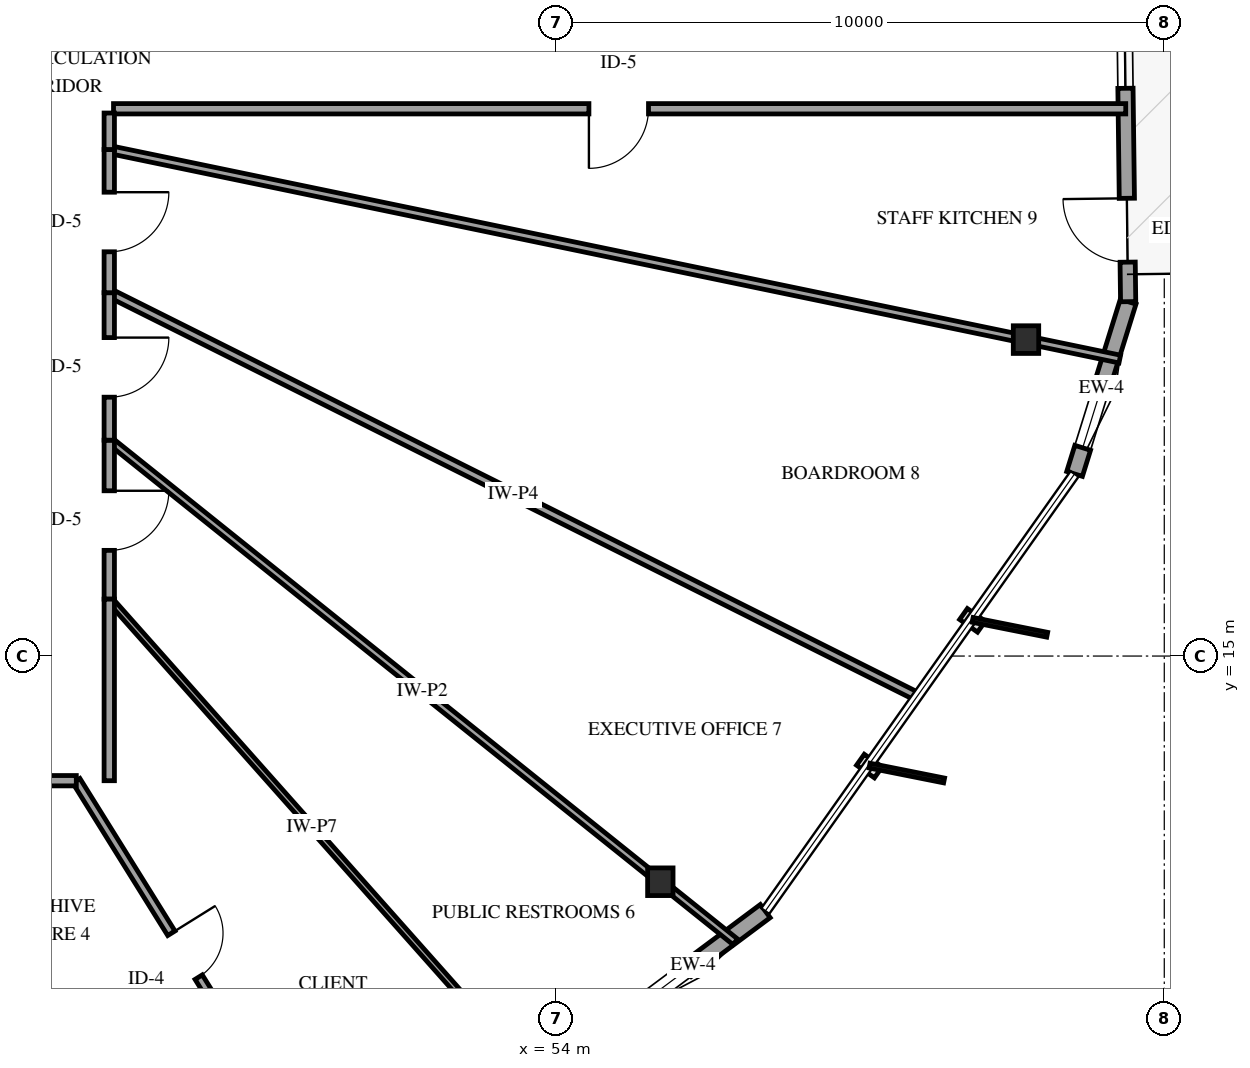
"""IFC4 building model, lengths in metres.
Left out: names, types, materials, properties, quantities, classifications, styles, units other than length and angle.
Written with IfcOpenShell. Run it as: python <this file> out.ifc"""

import sys

from ifc_helpers import new_model, si_unit, direction, frame, frame_2d, origin, origin_2d, place, context, subcontext, project, spatial, rectangle, i_section, extrude, element, fill, save


model = new_model("IFC4")
c1 = context("Model", 3, precision=1e-05, world=origin(), true_north=direction((0.0, 1.0)))
c2 = subcontext(c1, "Body", "Model", "MODEL_VIEW")
j1 = project(units=[si_unit("LENGTHUNIT", "METRE"), si_unit("PLANEANGLEUNIT", "RADIAN")], contexts=[c1])
p1 = place(None, origin())
s1 = spatial("IfcSite", under=j1, at=p1, CompositionType="ELEMENT")
p2 = place(p1, origin())
s2 = spatial("IfcBuilding", under=s1, at=p2, CompositionType="ELEMENT")
p3 = place(p2, frame((0.0, 0.0, 106.9)))
s3 = spatial("IfcBuildingStorey", under=s2, at=p3, CompositionType="ELEMENT", Elevation=106.9)
for number, where, z_axis, x_axis in (
    (1, (55.712, 11.289, 0.0), (0.0, 0.0, 1.0), (1.0, 0.0, 0.0)),
    (2, (61.726, 20.204, 0.0), (0.0, 0.0, 1.0), (1.0, 0.0, 0.0)),
):
    element("IfcColumn", number, at=place(p3, frame(where, z_axis=z_axis, x_axis=x_axis)), inside=s3, PredefinedType="COLUMN", context=c2, shape_type="SweptSolid", body=[
        extrude(i_section(OverallWidth=0.418, OverallDepth=0.455, WebThickness=0.042, FlangeThickness=0.068, FilletRadius=0.038, at=origin_2d()), origin(), (0.0, 0.0, 1.0), 3.9),
    ])
p4 = place(p3, frame((55.06, 9.032, 0.0), z_axis=(0.0, 0.0, 1.0), x_axis=(0.801547915112, 0.597930547622, 0.0)))
e3 = element("IfcWall", 3, at=p4, inside=s3, PredefinedType="SOLIDWALL", context=c2, shape_type="SweptSolid", body=[
    extrude(rectangle(XDim=2.966, YDim=0.27, at=frame_2d((1.483, 0.0))), origin(), (0.0, 0.0, 1.0), 2.979),
])
p5 = place(p4, frame((0.45, 0.0, 0.75)))
e4 = element("IfcOpeningElement", 4, at=p5, cuts=e3, PredefinedType="OPENING", context=c2, shape_type="SweptSolid", body=[
    extrude(rectangle(XDim=0.9, YDim=1.5, at=frame_2d((0.45, 0.75))), frame((0.0, 0.145, 0.0), z_axis=(0.0, -1.0, 0.0), x_axis=(1.0, 0.0, 0.0)), (0.0, 0.0, 1.0), 0.29),
])
p6 = place(p3, frame((62.525, 17.995, 0.0), z_axis=(0.0, 0.0, 1.0), x_axis=(0.29702819911, 0.954868707694, 0.0)))
e5 = element("IfcWall", 5, at=p6, inside=s3, PredefinedType="SOLIDWALL", context=c2, shape_type="SweptSolid", body=[
    extrude(rectangle(XDim=2.966, YDim=0.27, at=frame_2d((1.483, 0.0))), origin(), (0.0, 0.0, 1.0), 2.979),
])
p7 = place(p6, frame((0.45, 0.0, 0.75)))
e6 = element("IfcOpeningElement", 6, at=p7, cuts=e5, PredefinedType="OPENING", context=c2, shape_type="SweptSolid", body=[
    extrude(rectangle(XDim=0.9, YDim=1.5, at=frame_2d((0.45, 0.75))), frame((0.0, 0.145, 0.0), z_axis=(0.0, -1.0, 0.0), x_axis=(1.0, 0.0, 0.0)), (0.0, 0.0, 1.0), 0.29),
])
p8 = place(p3, frame((63.406, 20.828, 0.0), z_axis=(0.0, 0.0, 1.0), x_axis=(-0.012558271015, 0.999921141805, 0.0)))
e7 = element("IfcWall", 7, at=p8, inside=s3, PredefinedType="SOLIDWALL", context=c2, shape_type="SweptSolid", body=[
    extrude(rectangle(XDim=8.807, YDim=0.25, at=frame_2d((4.403, 0.0))), origin(), (0.0, 0.0, 1.0), 2.979),
])
p9 = place(p8, frame((0.65, 0.0, 0.0)))
e8 = element("IfcOpeningElement", 8, at=p9, cuts=e7, PredefinedType="OPENING", context=c2, shape_type="SweptSolid", body=[
    extrude(rectangle(XDim=1.05, YDim=2.15, at=frame_2d((0.525, 1.075))), frame((0.0, 0.135, 0.0), z_axis=(0.0, -1.0, 0.0), x_axis=(1.0, 0.0, 0.0)), (0.0, 0.0, 1.0), 0.27),
])
p10 = place(p8, frame((3.509, 0.0, 0.72)))
e9 = element("IfcOpeningElement", 9, at=p10, cuts=e7, PredefinedType="OPENING", context=c2, shape_type="SweptSolid", body=[
    extrude(rectangle(XDim=1.35, YDim=1.65, at=frame_2d((0.675, 0.825))), frame((0.0, 0.135, 0.0), z_axis=(0.0, -1.0, 0.0), x_axis=(1.0, 0.0, 0.0)), (0.0, 0.0, 1.0), 0.27),
])
p11 = place(p3, frame((46.65, 23.33, 0.0), z_axis=(0.0, 0.0, 1.0), x_axis=(0.979169088459, -0.203046537045, 0.0)))
e10 = element("IfcWall", 10, at=p11, inside=s3, PredefinedType="PARTITIONING", context=c2, shape_type="SweptSolid", body=[
    extrude(rectangle(XDim=16.972, YDim=0.13, at=frame_2d((8.486, 0.0))), origin(), (0.0, 0.0, 1.0), 2.895),
])
p12 = place(p3, frame((63.366, 24.0, 0.0), z_axis=(0.0, 0.0, 1.0), x_axis=(-1.0, 0.0, 0.0)))
e11 = element("IfcWall", 11, at=p12, inside=s3, PredefinedType="PARTITIONING", context=c2, shape_type="SweptSolid", body=[
    extrude(rectangle(XDim=16.646, YDim=0.17, at=frame_2d((8.323, 0.0))), origin(), (0.0, 0.0, 1.0), 3.6),
])
p13 = place(p12, frame((7.848, 0.0, 0.0)))
e12 = element("IfcOpeningElement", 12, at=p13, cuts=e11, PredefinedType="OPENING", context=c2, shape_type="SweptSolid", body=[
    extrude(rectangle(XDim=0.98, YDim=2.15, at=frame_2d((0.49, 1.075))), frame((0.0, 0.095, 0.0), z_axis=(0.0, -1.0, 0.0), x_axis=(1.0, 0.0, 0.0)), (0.0, 0.0, 1.0), 0.19),
])
p14 = place(p3, frame((46.65, 20.975, 0.0), z_axis=(0.0, 0.0, 1.0), x_axis=(0.894492933533, -0.447082086266, 0.0)))
e13 = element("IfcWall", 13, at=p14, inside=s3, PredefinedType="PARTITIONING", context=c2, shape_type="SweptSolid", body=[
    extrude(rectangle(XDim=14.852, YDim=0.14, at=frame_2d((7.426, 0.0))), origin(), (0.0, 0.0, 1.0), 3.6),
])
p15 = place(p3, frame((46.65, 18.55, 0.0), z_axis=(0.0, 0.0, 1.0), x_axis=(0.780391932211, -0.625290678117, 0.0)))
e14 = element("IfcWall", 14, at=p15, inside=s3, PredefinedType="PARTITIONING", context=c2, shape_type="SweptSolid", body=[
    extrude(rectangle(XDim=13.192, YDim=0.12, at=frame_2d((6.596, 0.0))), origin(), (0.0, 0.0, 1.0), 2.978),
])
p16 = place(p3, frame((46.65, 15.936, 0.0), z_axis=(0.0, 0.0, 1.0), x_axis=(0.66409177884, -0.747651061176, 0.0)))
e15 = element("IfcWall", 15, at=p16, inside=s3, PredefinedType="PARTITIONING", context=c2, shape_type="SweptSolid", body=[
    extrude(rectangle(XDim=10.028, YDim=0.1, at=frame_2d((5.014, 0.0))), origin(), (0.0, 0.0, 1.0), 2.978),
])
p17 = place(p3, frame((43.455, 12.95, 0.0), z_axis=(0.0, 0.0, 1.0), x_axis=(0.373857978329, -0.927485963258, 0.0)))
e16 = element("IfcWall", 16, at=p17, inside=s3, PredefinedType="PARTITIONING", context=c2, shape_type="SweptSolid", body=[
    extrude(rectangle(XDim=7.366, YDim=0.13, at=frame_2d((3.683, 0.0))), origin(), (0.0, 0.0, 1.0), 2.895),
])
p18 = place(p3, frame((46.108, 12.95, 0.0), z_axis=(0.0, 0.0, 1.0), x_axis=(0.528794527815, -0.848749873256, 0.0)))
e17 = element("IfcWall", 17, at=p18, inside=s3, PredefinedType="PARTITIONING", context=c2, shape_type="SweptSolid", body=[
    extrude(rectangle(XDim=6.763, YDim=0.14, at=frame_2d((3.381, 0.0))), origin(), (0.0, 0.0, 1.0), 3.6),
])
p19 = place(p18, frame((2.956, 0.0, 0.0)))
e18 = element("IfcOpeningElement", 18, at=p19, cuts=e17, PredefinedType="OPENING", context=c2, shape_type="SweptSolid", body=[
    extrude(rectangle(XDim=0.85, YDim=2.1, at=frame_2d((0.425, 1.05))), frame((0.0, 0.08, 0.0), z_axis=(0.0, -1.0, 0.0), x_axis=(1.0, 0.0, 0.0)), (0.0, 0.0, 1.0), 0.16),
])
p20 = place(p3, frame((46.108, 12.95, 0.0), z_axis=(0.0, 0.0, 1.0), x_axis=(-1.0, 0.0, 0.0)))
e19 = element("IfcWall", 19, at=p20, inside=s3, PredefinedType="PARTITIONING", context=c2, shape_type="SweptSolid", body=[
    extrude(rectangle(XDim=2.653, YDim=0.17, at=frame_2d((1.326, 0.0))), origin(), (0.0, 0.0, 1.0), 3.6),
])
p21 = place(p20, frame((0.851, 0.0, 0.0)))
e20 = element("IfcOpeningElement", 20, at=p21, cuts=e19, PredefinedType="OPENING", context=c2, shape_type="SweptSolid", body=[
    extrude(rectangle(XDim=0.98, YDim=2.15, at=frame_2d((0.49, 1.075))), frame((0.0, 0.095, 0.0), z_axis=(0.0, -1.0, 0.0), x_axis=(1.0, 0.0, 0.0)), (0.0, 0.0, 1.0), 0.19),
])
p22 = place(p3, frame((46.65, 18.55, 0.0), z_axis=(0.0, 0.0, 1.0), x_axis=(0.0, -1.0, 0.0)))
e21 = element("IfcWall", 21, at=p22, inside=s3, PredefinedType="PARTITIONING", context=c2, shape_type="SweptSolid", body=[
    extrude(rectangle(XDim=2.614, YDim=0.17, at=frame_2d((1.307, 0.0))), origin(), (0.0, 0.0, 1.0), 3.6),
])
p23 = place(p22, frame((0.832, 0.0, 0.0)))
e22 = element("IfcOpeningElement", 22, at=p23, cuts=e21, PredefinedType="OPENING", context=c2, shape_type="SweptSolid", body=[
    extrude(rectangle(XDim=0.98, YDim=2.15, at=frame_2d((0.49, 1.075))), frame((0.0, 0.095, 0.0), z_axis=(0.0, -1.0, 0.0), x_axis=(1.0, 0.0, 0.0)), (0.0, 0.0, 1.0), 0.19),
])
p24 = place(p3, frame((46.65, 20.975, 0.0), z_axis=(0.0, 0.0, 1.0), x_axis=(0.0, -1.0, 0.0)))
e23 = element("IfcWall", 23, at=p24, inside=s3, PredefinedType="PARTITIONING", context=c2, shape_type="SweptSolid", body=[
    extrude(rectangle(XDim=2.425, YDim=0.17, at=frame_2d((1.212, 0.0))), origin(), (0.0, 0.0, 1.0), 3.6),
])
p25 = place(p24, frame((0.738, 0.0, 0.0)))
e24 = element("IfcOpeningElement", 24, at=p25, cuts=e23, PredefinedType="OPENING", context=c2, shape_type="SweptSolid", body=[
    extrude(rectangle(XDim=0.98, YDim=2.15, at=frame_2d((0.49, 1.075))), frame((0.0, 0.095, 0.0), z_axis=(0.0, -1.0, 0.0), x_axis=(1.0, 0.0, 0.0)), (0.0, 0.0, 1.0), 0.19),
])
p26 = place(p3, frame((46.65, 23.33, 0.0), z_axis=(0.0, 0.0, 1.0), x_axis=(0.0, -1.0, 0.0)))
e25 = element("IfcWall", 25, at=p26, inside=s3, PredefinedType="PARTITIONING", context=c2, shape_type="SweptSolid", body=[
    extrude(rectangle(XDim=2.355, YDim=0.17, at=frame_2d((1.177, 0.0))), origin(), (0.0, 0.0, 1.0), 3.6),
])
p27 = place(p26, frame((0.702, 0.0, 0.0)))
e26 = element("IfcOpeningElement", 26, at=p27, cuts=e25, PredefinedType="OPENING", context=c2, shape_type="SweptSolid", body=[
    extrude(rectangle(XDim=0.98, YDim=2.15, at=frame_2d((0.49, 1.075))), frame((0.0, 0.095, 0.0), z_axis=(0.0, -1.0, 0.0), x_axis=(1.0, 0.0, 0.0)), (0.0, 0.0, 1.0), 0.19),
])
p28 = place(p3, frame((46.65, 23.93, 0.0), z_axis=(0.0, 0.0, 1.0), x_axis=(0.0, -1.0, 0.0)))
e27 = element("IfcWall", 27, at=p28, inside=s3, PredefinedType="PARTITIONING", context=c2, shape_type="SweptSolid", body=[
    extrude(rectangle(XDim=0.6, YDim=0.17, at=frame_2d((0.3, 0.0))), origin(), (0.0, 0.0, 1.0), 3.6),
])
p29 = place(p3, frame((46.65, 15.936, 0.0), z_axis=(0.0, 0.0, 1.0), x_axis=(0.0, -1.0, 0.0)))
e28 = element("IfcWall", 28, at=p29, inside=s3, PredefinedType="PARTITIONING", context=c2, shape_type="SweptSolid", body=[
    extrude(rectangle(XDim=2.986, YDim=0.17, at=frame_2d((1.493, 0.0))), origin(), (0.0, 0.0, 1.0), 3.6),
])
p30 = place(p5, origin())
e29 = element("IfcWindow", 29, at=p30, inside=s3, PartitioningType="SINGLE_PANEL", PredefinedType="WINDOW", context=c2, shape_type="SweptSolid", body=[
    extrude(rectangle(XDim=0.9, YDim=1.5, at=frame_2d((0.45, 0.75))), frame((0.0, 0.03, 0.0), z_axis=(0.0, -1.0, 0.0), x_axis=(1.0, 0.0, 0.0)), (0.0, 0.0, 1.0), 0.06),
])
fill(e4, e29)
p31 = place(p7, origin())
e30 = element("IfcWindow", 30, at=p31, inside=s3, PartitioningType="SINGLE_PANEL", PredefinedType="WINDOW", context=c2, shape_type="SweptSolid", body=[
    extrude(rectangle(XDim=0.9, YDim=1.5, at=frame_2d((0.45, 0.75))), frame((0.0, 0.03, 0.0), z_axis=(0.0, -1.0, 0.0), x_axis=(1.0, 0.0, 0.0)), (0.0, 0.0, 1.0), 0.06),
])
fill(e6, e30)
p32 = place(p9, origin())
e31 = element("IfcDoor", 31, at=p32, inside=s3, OperationType="SINGLE_SWING_RIGHT", PredefinedType="DOOR", context=c2, shape_type="SweptSolid", body=[
    extrude(rectangle(XDim=1.05, YDim=2.15, at=frame_2d((0.525, 1.075))), frame((0.0, 0.025, 0.0), z_axis=(0.0, -1.0, 0.0), x_axis=(1.0, 0.0, 0.0)), (0.0, 0.0, 1.0), 0.05),
])
fill(e8, e31)
p33 = place(p10, origin())
e32 = element("IfcWindow", 32, at=p33, inside=s3, PartitioningType="SINGLE_PANEL", PredefinedType="WINDOW", context=c2, shape_type="SweptSolid", body=[
    extrude(rectangle(XDim=1.35, YDim=1.65, at=frame_2d((0.675, 0.825))), frame((0.0, 0.03, 0.0), z_axis=(0.0, -1.0, 0.0), x_axis=(1.0, 0.0, 0.0)), (0.0, 0.0, 1.0), 0.06),
])
fill(e9, e32)
p34 = place(p13, origin())
e33 = element("IfcDoor", 33, at=p34, inside=s3, OperationType="SINGLE_SWING_RIGHT", PredefinedType="DOOR", context=c2, shape_type="SweptSolid", body=[
    extrude(rectangle(XDim=0.98, YDim=2.15, at=frame_2d((0.49, 1.075))), frame((0.0, 0.025, 0.0), z_axis=(0.0, -1.0, 0.0), x_axis=(1.0, 0.0, 0.0)), (0.0, 0.0, 1.0), 0.05),
])
fill(e12, e33)
p35 = place(p19, origin())
e34 = element("IfcDoor", 34, at=p35, inside=s3, OperationType="SINGLE_SWING_LEFT", PredefinedType="DOOR", context=c2, shape_type="SweptSolid", body=[
    extrude(rectangle(XDim=0.85, YDim=2.1, at=frame_2d((0.425, 1.05))), frame((0.0, 0.025, 0.0), z_axis=(0.0, -1.0, 0.0), x_axis=(1.0, 0.0, 0.0)), (0.0, 0.0, 1.0), 0.05),
])
fill(e18, e34)
p36 = place(p23, origin())
e35 = element("IfcDoor", 35, at=p36, inside=s3, OperationType="SINGLE_SWING_LEFT", PredefinedType="DOOR", context=c2, shape_type="SweptSolid", body=[
    extrude(rectangle(XDim=0.98, YDim=2.15, at=frame_2d((0.49, 1.075))), frame((0.0, 0.025, 0.0), z_axis=(0.0, -1.0, 0.0), x_axis=(1.0, 0.0, 0.0)), (0.0, 0.0, 1.0), 0.05),
])
fill(e22, e35)
p37 = place(p25, origin())
e36 = element("IfcDoor", 36, at=p37, inside=s3, OperationType="SINGLE_SWING_LEFT", PredefinedType="DOOR", context=c2, shape_type="SweptSolid", body=[
    extrude(rectangle(XDim=0.98, YDim=2.15, at=frame_2d((0.49, 1.075))), frame((0.0, 0.025, 0.0), z_axis=(0.0, -1.0, 0.0), x_axis=(1.0, 0.0, 0.0)), (0.0, 0.0, 1.0), 0.05),
])
fill(e24, e36)
p38 = place(p27, origin())
e37 = element("IfcDoor", 37, at=p38, inside=s3, OperationType="SINGLE_SWING_LEFT", PredefinedType="DOOR", context=c2, shape_type="SweptSolid", body=[
    extrude(rectangle(XDim=0.98, YDim=2.15, at=frame_2d((0.49, 1.075))), frame((0.0, 0.025, 0.0), z_axis=(0.0, -1.0, 0.0), x_axis=(1.0, 0.0, 0.0)), (0.0, 0.0, 1.0), 0.05),
])
fill(e26, e37)
save(model, sys.argv[1])
